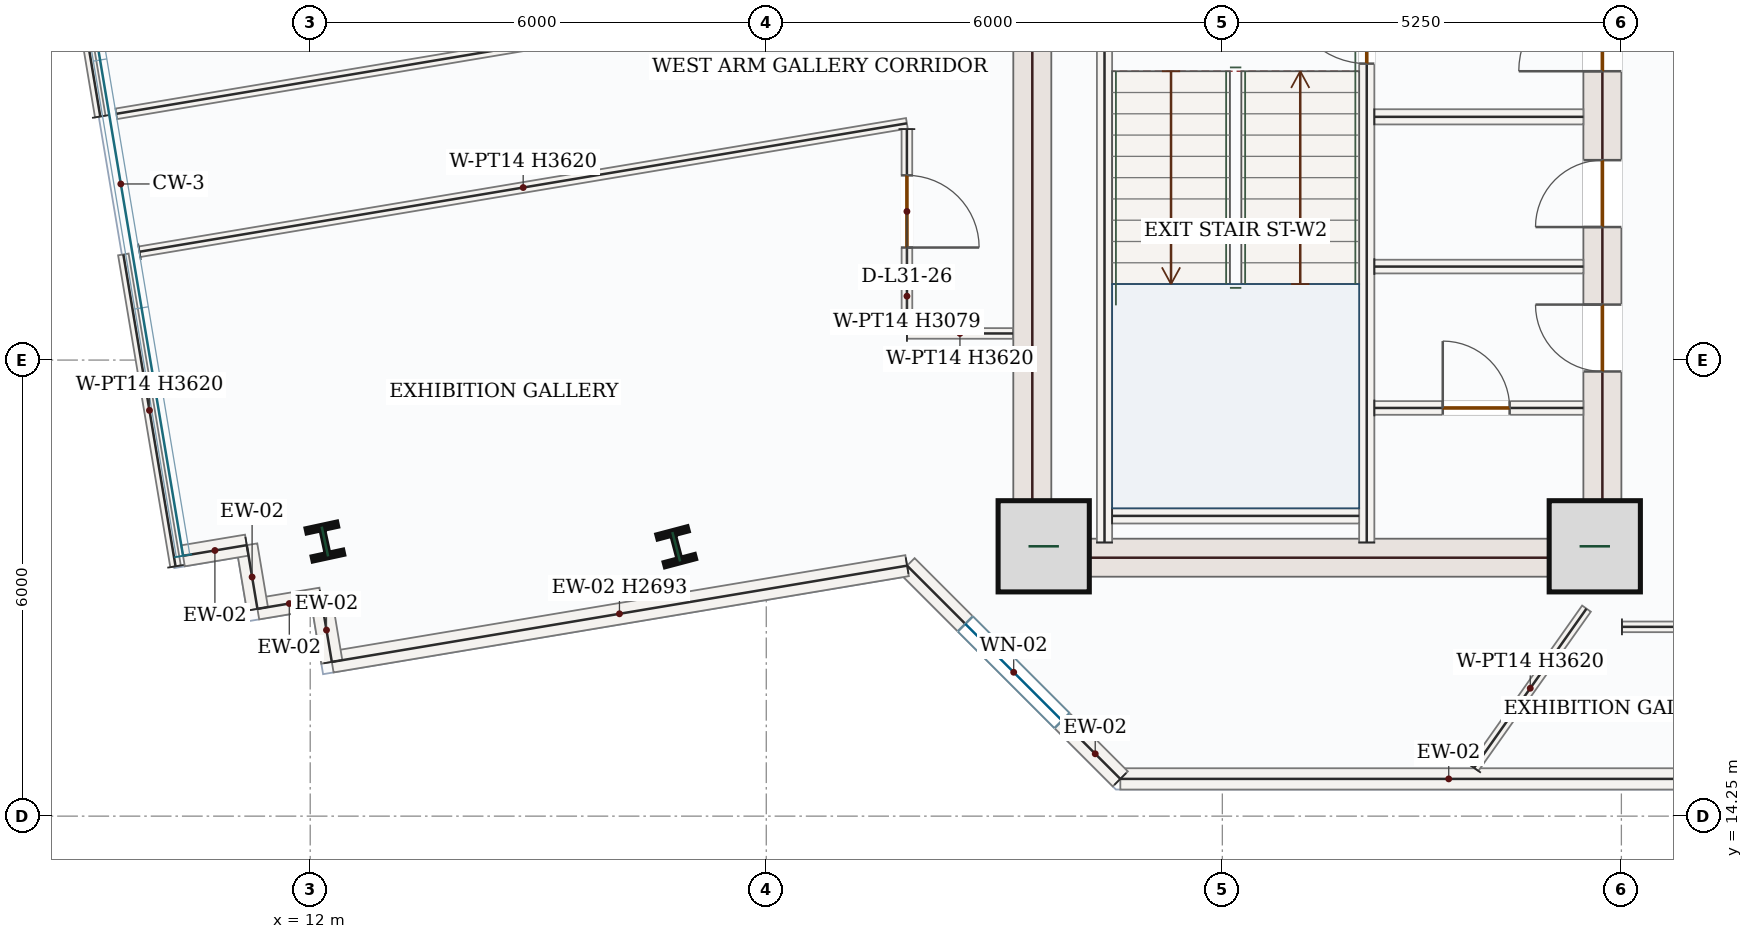
"""IFC4 building model, lengths in metres.
Left out: names, types, materials, properties, quantities, classifications, styles, units other than length and angle.
Written with IfcOpenShell. Run it as: python <this file> out.ifc"""

import sys

from ifc_helpers import new_model, si_unit, direction, frame, frame_2d, origin, origin_2d, place, context, subcontext, project, spatial, rectangle, i_section, extrude, source, transform, mapped, element, fill, save


model = new_model("IFC4")
c1 = context("Model", 3, precision=1e-05, world=origin(), true_north=direction((0.0, 1.0)))
c2 = subcontext(c1, "Body", "Model", "MODEL_VIEW")
j1 = project(units=[si_unit("LENGTHUNIT", "METRE"), si_unit("PLANEANGLEUNIT", "RADIAN")], contexts=[c1])
p1 = place(None, origin())
s1 = spatial("IfcSite", under=j1, at=p1, CompositionType="ELEMENT")
p2 = place(p1, origin())
s2 = spatial("IfcBuilding", under=s1, at=p2, CompositionType="ELEMENT")
p3 = place(p2, frame((0.0, 0.0, 139.5)))
s3 = spatial("IfcBuildingStorey", under=s2, at=p3, CompositionType="ELEMENT", Elevation=139.5)
m1 = source(origin(), c2, "Body", "SweptSolid", [
    extrude(rectangle(XDim=8.55, YDim=0.5, at=frame_2d((4.275, 0.0))), origin(), (0.0, 0.0, 1.0), 3.62),
])
p4 = place(p3, frame((21.5, 17.4, 0.0), z_axis=(0.0, 0.0, 1.0), x_axis=(0.0, 1.0, 0.0)))
e1 = element("IfcWall", 1, at=p4, inside=s3, PredefinedType="SHEAR", context=c2, shape_type="MappedRepresentation", body=[
    mapped(m1, transform((0.0, 0.0, 0.0), x_axis=(1.0, 0.0, 0.0), y_axis=(0.0, 1.0, 0.0), z_axis=(0.0, 0.0, 1.0), scale=1.0)),
])
p5 = place(p3, frame((29.0, 17.4, 0.0), z_axis=(0.0, 0.0, 1.0), x_axis=(0.0, 1.0, 0.0)))
e2 = element("IfcWall", 2, at=p5, inside=s3, PredefinedType="SHEAR", context=c2, shape_type="SweptSolid", body=[
    extrude(rectangle(XDim=8.55, YDim=0.5, at=frame_2d((4.275, 0.0))), origin(), (0.0, 0.0, 1.0), 3.62),
])
p6 = place(p5, frame((6.65, 0.0, 0.0)))
e3 = element("IfcOpeningElement", 3, at=p6, cuts=e2, PredefinedType="OPENING", context=c2, shape_type="SweptSolid", body=[
    extrude(rectangle(XDim=1.1, YDim=2.2, at=frame_2d((0.55, 1.1))), frame((0.0, 0.26, 0.0), z_axis=(0.0, -1.0, 0.0), x_axis=(1.0, 0.0, 0.0)), (0.0, 0.0, 1.0), 0.52),
])
p7 = place(p5, frame((2.7, 0.0, 0.0)))
e4 = element("IfcOpeningElement", 4, at=p7, cuts=e2, PredefinedType="OPENING", context=c2, shape_type="SweptSolid", body=[
    extrude(rectangle(XDim=0.88, YDim=2.1, at=frame_2d((0.44, 1.05))), frame((0.0, 0.26, 0.0), z_axis=(0.0, -1.0, 0.0), x_axis=(1.0, 0.0, 0.0)), (0.0, 0.0, 1.0), 0.52),
])
p8 = place(p5, frame((4.6, 0.0, 0.0)))
e5 = element("IfcOpeningElement", 5, at=p8, cuts=e2, PredefinedType="OPENING", context=c2, shape_type="SweptSolid", body=[
    extrude(rectangle(XDim=0.88, YDim=2.1, at=frame_2d((0.44, 1.05))), frame((0.0, 0.26, 0.0), z_axis=(0.0, -1.0, 0.0), x_axis=(1.0, 0.0, 0.0)), (0.0, 0.0, 1.0), 0.52),
])
m2 = source(origin(), c2, "Body", "SweptSolid", [
    extrude(rectangle(XDim=7.0, YDim=0.5, at=frame_2d((3.5, 0.0))), origin(), (0.0, 0.0, 1.0), 3.62),
])
p9 = place(p3, frame((21.75, 17.65, 0.0), z_axis=(0.0, 0.0, 1.0), x_axis=(1.0, 0.0, 0.0)))
e6 = element("IfcWall", 6, at=p9, inside=s3, PredefinedType="SHEAR", context=c2, shape_type="MappedRepresentation", body=[
    mapped(m2, transform((0.0, 0.0, 0.0), x_axis=(1.0, 0.0, 0.0), y_axis=(0.0, 1.0, 0.0), z_axis=(0.0, 0.0, 1.0), scale=1.0)),
])
m3 = source(origin(), c2, "Body", "SweptSolid", [
    extrude(rectangle(XDim=1.2, YDim=1.2, at=origin_2d()), origin(), (0.0, 0.0, 1.0), 3.9),
])
for number, where, z_axis, x_axis in (
    (7, (21.65, 17.8, 0.0), (0.0, 0.0, 1.0), (1.0, 0.0, 0.0)),
    (8, (28.9, 17.8, 0.0), (0.0, 0.0, 1.0), (1.0, 0.0, 0.0)),
):
    element("IfcColumn", number, at=place(p3, frame(where, z_axis=z_axis, x_axis=x_axis)), inside=s3, PredefinedType="COLUMN", context=c2, shape_type="MappedRepresentation", body=[
        mapped(m3, transform((0.0, 0.0, 0.0), x_axis=(1.0, 0.0, 0.0), y_axis=(0.0, 1.0, 0.0), z_axis=(0.0, 0.0, 1.0), scale=1.0)),
    ])
m4 = source(origin(), c2, "Body", "SweptSolid", [
    extrude(i_section(OverallWidth=0.412, OverallDepth=0.435, WebThickness=0.036, FlangeThickness=0.057, FilletRadius=0.018, at=origin_2d()), origin(), (0.0, 0.0, 1.0), 3.9),
])
for number, where, z_axis, x_axis in (
    (9, (16.815, 17.794, 0.0), (0.0, 0.0, 1.0), (0.967, 0.255, 0.0)),
    (10, (12.193, 17.863, 0.0), (0.0, 0.0, 1.0), (0.977, 0.211, 0.0)),
):
    element("IfcColumn", number, at=place(p3, frame(where, z_axis=z_axis, x_axis=x_axis)), inside=s3, PredefinedType="COLUMN", context=c2, shape_type="MappedRepresentation", body=[
        mapped(m4, transform((0.0, 0.0, 0.0), x_axis=(1.0, 0.0, 0.0), y_axis=(0.0, 1.0, 0.0), z_axis=(0.0, 0.0, 1.0), scale=1.0)),
    ])
m5 = source(origin(), c2, "Body", "SweptSolid", [
    extrude(rectangle(XDim=8.641, YDim=0.28, at=frame_2d((4.321, 0.0))), origin(), (0.0, 0.0, 1.0), 3.62),
])
p10 = place(p3, frame((31.299, 14.74, 0.0), z_axis=(0.0, 0.0, 1.0), x_axis=(-1.0, 0.0, 0.0)))
e11 = element("IfcWall", 11, at=p10, inside=s3, PredefinedType="SOLIDWALL", context=c2, shape_type="MappedRepresentation", body=[
    mapped(m5, transform((0.0, 0.0, 0.0), x_axis=(1.0, 0.0, 0.0), y_axis=(0.0, 1.0, 0.0), z_axis=(0.0, 0.0, 1.0), scale=1.0)),
])
p11 = place(p3, frame((22.658, 14.74, 0.0), z_axis=(0.0, 0.0, 1.0), x_axis=(-0.707076011326, 0.707137549708, 0.0)))
e12 = element("IfcWall", 12, at=p11, inside=s3, PredefinedType="SOLIDWALL", context=c2, shape_type="SweptSolid", body=[
    extrude(rectangle(XDim=3.967, YDim=0.28, at=frame_2d((1.984, 0.0))), origin(), (0.0, 0.0, 1.0), 3.62),
])
p12 = place(p11, frame((1.084, 0.0, 0.85)))
e13 = element("IfcOpeningElement", 13, at=p12, cuts=e12, PredefinedType="OPENING", context=c2, shape_type="SweptSolid", body=[
    extrude(rectangle(XDim=1.8, YDim=1.75, at=frame_2d((0.9, 0.875))), frame((0.0, 0.15, 0.0), z_axis=(0.0, -1.0, 0.0), x_axis=(1.0, 0.0, 0.0)), (0.0, 0.0, 1.0), 0.3),
])
m6 = source(origin(), c2, "Body", "SweptSolid", [
    extrude(rectangle(XDim=7.674, YDim=0.28, at=frame_2d((3.837, 0.0))), origin(), (0.0, 0.0, 1.0), 2.693),
])
p13 = place(p3, frame((19.853, 17.545, 0.0), z_axis=(0.0, 0.0, 1.0), x_axis=(-0.986284504747, -0.165054159886, 0.0)))
e14 = element("IfcWall", 14, at=p13, inside=s3, PredefinedType="SOLIDWALL", context=c2, shape_type="MappedRepresentation", body=[
    mapped(m6, transform((0.0, 0.0, 0.0), x_axis=(1.0, 0.0, 0.0), y_axis=(0.0, 1.0, 0.0), z_axis=(0.0, 0.0, 1.0), scale=1.0)),
])
m7 = source(origin(), c2, "Body", "SweptSolid", [
    extrude(rectangle(XDim=0.85, YDim=0.28, at=frame_2d((0.425, 0.0))), origin(), (0.0, 0.0, 1.0), 3.62),
])
for number, where, z_axis, x_axis in (
    (15, (12.284, 16.279, 0.0), (0.0, 0.0, 1.0), (-0.165, 0.986, 0.0)),
    (16, (12.144, 17.117, 0.0), (0.0, 0.0, 1.0), (-0.986, -0.165, 0.0)),
    (17, (11.306, 16.977, 0.0), (0.0, 0.0, 1.0), (-0.165, 0.986, 0.0)),
    (18, (11.165, 17.815, 0.0), (0.0, 0.0, 1.0), (-0.986, -0.165, 0.0)),
):
    element("IfcWall", number, at=place(p3, frame(where, z_axis=z_axis, x_axis=x_axis)), inside=s3, PredefinedType="SOLIDWALL", context=c2, shape_type="MappedRepresentation", body=[
        mapped(m7, transform((0.0, 0.0, 0.0), x_axis=(1.0, 0.0, 0.0), y_axis=(0.0, 1.0, 0.0), z_axis=(0.0, 0.0, 1.0), scale=1.0)),
    ])
m8 = source(origin(), c2, "Body", "SweptSolid", [
    extrude(rectangle(XDim=7.87, YDim=0.2, at=frame_2d((3.935, 0.0))), origin(), (0.0, 0.0, 1.0), 3.62),
])
p14 = place(p3, frame((22.45, 17.85, 0.0), z_axis=(0.0, 0.0, 1.0), x_axis=(0.0, 1.0, 0.0)))
e19 = element("IfcWall", 19, at=p14, inside=s3, PredefinedType="SOLIDWALL", context=c2, shape_type="MappedRepresentation", body=[
    mapped(m8, transform((0.0, 0.0, 0.0), x_axis=(1.0, 0.0, 0.0), y_axis=(0.0, 1.0, 0.0), z_axis=(0.0, 0.0, 1.0), scale=1.0)),
])
p15 = place(p3, frame((25.9, 17.85, 0.0), z_axis=(0.0, 0.0, 1.0), x_axis=(0.0, 1.0, 0.0)))
e20 = element("IfcWall", 20, at=p15, inside=s3, PredefinedType="SOLIDWALL", context=c2, shape_type="SweptSolid", body=[
    extrude(rectangle(XDim=8.0, YDim=0.2, at=frame_2d((4.0, 0.0))), origin(), (0.0, 0.0, 1.0), 3.62),
])
p16 = place(p15, frame((6.3, 0.0, 0.0)))
e21 = element("IfcOpeningElement", 21, at=p16, cuts=e20, PredefinedType="OPENING", context=c2, shape_type="SweptSolid", body=[
    extrude(rectangle(XDim=1.05, YDim=2.15, at=frame_2d((0.525, 1.075))), frame((0.0, 0.11, 0.0), z_axis=(0.0, -1.0, 0.0), x_axis=(1.0, 0.0, 0.0)), (0.0, 0.0, 1.0), 0.22),
])
m9 = source(origin(), c2, "Body", "SweptSolid", [
    extrude(rectangle(XDim=3.25, YDim=0.2, at=frame_2d((1.625, 0.0))), origin(), (0.0, 0.0, 1.0), 3.62),
])
p17 = place(p3, frame((22.55, 18.2, 0.0), z_axis=(0.0, 0.0, 1.0), x_axis=(1.0, 0.0, 0.0)))
e22 = element("IfcWall", 22, at=p17, inside=s3, PredefinedType="SOLIDWALL", context=c2, shape_type="MappedRepresentation", body=[
    mapped(m9, transform((0.0, 0.0, 0.0), x_axis=(1.0, 0.0, 0.0), y_axis=(0.0, 1.0, 0.0), z_axis=(0.0, 0.0, 1.0), scale=1.0)),
])
m10 = source(origin(), c2, "Body", "SweptSolid", [
    extrude(rectangle(XDim=2.75, YDim=0.2, at=frame_2d((1.375, 0.0))), origin(), (0.0, 0.0, 1.0), 3.62),
])
p18 = place(p3, frame((26.0, 23.45, 0.0), z_axis=(0.0, 0.0, 1.0), x_axis=(1.0, 0.0, 0.0)))
e23 = element("IfcWall", 23, at=p18, inside=s3, PredefinedType="SOLIDWALL", context=c2, shape_type="MappedRepresentation", body=[
    mapped(m10, transform((0.0, 0.0, 0.0), x_axis=(1.0, 0.0, 0.0), y_axis=(0.0, 1.0, 0.0), z_axis=(0.0, 0.0, 1.0), scale=1.0)),
])
p19 = place(p3, frame((26.0, 19.62, 0.0), z_axis=(0.0, 0.0, 1.0), x_axis=(1.0, 0.0, 0.0)))
e24 = element("IfcWall", 24, at=p19, inside=s3, PredefinedType="PARTITIONING", context=c2, shape_type="SweptSolid", body=[
    extrude(rectangle(XDim=2.75, YDim=0.18, at=frame_2d((1.375, 0.0))), origin(), (0.0, 0.0, 1.0), 3.62),
])
p20 = place(p19, frame((0.9, 0.0, 0.0)))
e25 = element("IfcOpeningElement", 25, at=p20, cuts=e24, PredefinedType="OPENING", context=c2, shape_type="SweptSolid", body=[
    extrude(rectangle(XDim=0.88, YDim=2.1, at=frame_2d((0.44, 1.05))), frame((0.0, 0.1, 0.0), z_axis=(0.0, -1.0, 0.0), x_axis=(1.0, 0.0, 0.0)), (0.0, 0.0, 1.0), 0.2),
])
m11 = source(origin(), c2, "Body", "SweptSolid", [
    extrude(rectangle(XDim=2.75, YDim=0.18, at=frame_2d((1.375, 0.0))), origin(), (0.0, 0.0, 1.0), 3.62),
])
p21 = place(p3, frame((26.0, 21.48, 0.0), z_axis=(0.0, 0.0, 1.0), x_axis=(1.0, 0.0, 0.0)))
e26 = element("IfcWall", 26, at=p21, inside=s3, PredefinedType="PARTITIONING", context=c2, shape_type="MappedRepresentation", body=[
    mapped(m11, transform((0.0, 0.0, 0.0), x_axis=(1.0, 0.0, 0.0), y_axis=(0.0, 1.0, 0.0), z_axis=(0.0, 0.0, 1.0), scale=1.0)),
])
p22 = place(p3, frame((29.258, 16.74, 0.0), z_axis=(0.0, 0.0, 1.0), x_axis=(0.999999999474, -3.2436991e-05, 0.0)))
e27 = element("IfcWall", 27, at=p22, inside=s3, PredefinedType="PARTITIONING", context=c2, shape_type="SweptSolid", body=[
    extrude(rectangle(XDim=7.527, YDim=0.14, at=frame_2d((3.763, 0.0))), origin(), (0.0, 0.0, 1.0), 3.62),
])
p23 = place(p22, frame((5.13, 0.0, 0.0)))
e28 = element("IfcOpeningElement", 28, at=p23, cuts=e27, PredefinedType="OPENING", context=c2, shape_type="SweptSolid", body=[
    extrude(rectangle(XDim=0.95, YDim=2.15, at=frame_2d((0.475, 1.075))), frame((0.0, 0.08, 0.0), z_axis=(0.0, -1.0, 0.0), x_axis=(1.0, 0.0, 0.0)), (0.0, 0.0, 1.0), 0.16),
])
m12 = source(origin(), c2, "Body", "SweptSolid", [
    extrude(rectangle(XDim=2.565, YDim=0.14, at=frame_2d((1.282, 0.0))), origin(), (0.0, 0.0, 1.0), 3.62),
])
p24 = place(p3, frame((27.311, 14.885, 0.0), z_axis=(0.0, 0.0, 1.0), x_axis=(0.576926084836, 0.816796359343, 0.0)))
e29 = element("IfcWall", 29, at=p24, inside=s3, PredefinedType="PARTITIONING", context=c2, shape_type="MappedRepresentation", body=[
    mapped(m12, transform((0.0, 0.0, 0.0), x_axis=(1.0, 0.0, 0.0), y_axis=(0.0, 1.0, 0.0), z_axis=(0.0, 0.0, 1.0), scale=1.0)),
])
m13 = source(origin(), c2, "Body", "SweptSolid", [
    extrude(rectangle(XDim=10.544, YDim=0.14, at=frame_2d((5.272, 0.0))), origin(), (0.0, 0.0, 1.0), 3.62),
])
p25 = place(p3, frame((19.85, 25.23, 0.0), z_axis=(0.0, 0.0, 1.0), x_axis=(-0.986287336963, -0.165037235031, 0.0)))
e30 = element("IfcWall", 30, at=p25, inside=s3, PredefinedType="PARTITIONING", context=c2, shape_type="MappedRepresentation", body=[
    mapped(m13, transform((0.0, 0.0, 0.0), x_axis=(1.0, 0.0, 0.0), y_axis=(0.0, 1.0, 0.0), z_axis=(0.0, 0.0, 1.0), scale=1.0)),
])
m14 = source(origin(), c2, "Body", "SweptSolid", [
    extrude(rectangle(XDim=4.16, YDim=0.14, at=frame_2d((2.08, 0.0))), origin(), (0.0, 0.0, 1.0), 3.62),
])
for number, where, z_axis, x_axis in (
    (31, (9.238, 23.454, 0.0), (0.0, 0.0, 1.0), (-0.165, 0.986, 0.0)),
    (32, (10.229, 17.537, 0.0), (0.0, 0.0, 1.0), (-0.165, 0.986, 0.0)),
):
    element("IfcWall", number, at=place(p3, frame(where, z_axis=z_axis, x_axis=x_axis)), inside=s3, PredefinedType="PARTITIONING", context=c2, shape_type="MappedRepresentation", body=[
        mapped(m14, transform((0.0, 0.0, 0.0), x_axis=(1.0, 0.0, 0.0), y_axis=(0.0, 1.0, 0.0), z_axis=(0.0, 0.0, 1.0), scale=1.0)),
    ])
m15 = source(origin(), c2, "Body", "SweptSolid", [
    extrude(rectangle(XDim=10.237, YDim=0.14, at=frame_2d((5.118, 0.0))), origin(), (0.0, 0.0, 1.0), 3.62),
])
p26 = place(p3, frame((9.754, 21.675, 0.0), z_axis=(0.0, 0.0, 1.0), x_axis=(0.986290594835, 0.165017764319, 0.0)))
e33 = element("IfcWall", 33, at=p26, inside=s3, PredefinedType="PARTITIONING", context=c2, shape_type="MappedRepresentation", body=[
    mapped(m15, transform((0.0, 0.0, 0.0), x_axis=(1.0, 0.0, 0.0), y_axis=(0.0, 1.0, 0.0), z_axis=(0.0, 0.0, 1.0), scale=1.0)),
])
p27 = place(p3, frame((19.85, 23.289, 0.0), z_axis=(0.0, 0.0, 1.0), x_axis=(0.000363372069, -0.99999993398, 0.0)))
e34 = element("IfcWall", 34, at=p27, inside=s3, PredefinedType="PARTITIONING", context=c2, shape_type="SweptSolid", body=[
    extrude(rectangle(XDim=2.688, YDim=0.14, at=frame_2d((1.344, 0.0))), origin(), (0.0, 0.0, 1.0), 3.079),
])
p28 = place(p27, frame((0.608, 0.0, 0.0)))
e35 = element("IfcOpeningElement", 35, at=p28, cuts=e34, PredefinedType="OPENING", context=c2, shape_type="SweptSolid", body=[
    extrude(rectangle(XDim=0.95, YDim=2.15, at=frame_2d((0.475, 1.075))), frame((0.0, 0.08, 0.0), z_axis=(0.0, -1.0, 0.0), x_axis=(1.0, 0.0, 0.0)), (0.0, 0.0, 1.0), 0.16),
])
m16 = source(origin(), c2, "Body", "SweptSolid", [
    extrude(rectangle(XDim=1.394, YDim=0.14, at=frame_2d((0.697, 0.0))), origin(), (0.0, 0.0, 1.0), 3.62),
])
p29 = place(p3, frame((19.851, 20.601, 0.0), z_axis=(0.0, 0.0, 1.0), x_axis=(0.999999754632, -0.000700525222, 0.0)))
e36 = element("IfcWall", 36, at=p29, inside=s3, PredefinedType="PARTITIONING", context=c2, shape_type="MappedRepresentation", body=[
    mapped(m16, transform((0.0, 0.0, 0.0), x_axis=(1.0, 0.0, 0.0), y_axis=(0.0, 1.0, 0.0), z_axis=(0.0, 0.0, 1.0), scale=1.0)),
])
m17 = source(origin(), c2, "Body", "SweptSolid", [
    extrude(rectangle(XDim=1.8, YDim=1.75, at=frame_2d((0.9, 0.875))), frame((0.0, 0.03, 0.0), z_axis=(0.0, -1.0, 0.0), x_axis=(1.0, 0.0, 0.0)), (0.0, 0.0, 1.0), 0.06),
])
p30 = place(p12, origin())
e37 = element("IfcWindow", 37, at=p30, inside=s3, PartitioningType="DOUBLE_PANEL_VERTICAL", PredefinedType="WINDOW", context=c2, shape_type="MappedRepresentation", body=[
    mapped(m17, transform((0.0, 0.0, 0.0), x_axis=(1.0, 0.0, 0.0), y_axis=(0.0, 1.0, 0.0), z_axis=(0.0, 0.0, 1.0), scale=1.0)),
])
fill(e13, e37)
m18 = source(origin(), c2, "Body", "SweptSolid", [
    extrude(rectangle(XDim=1.05, YDim=2.15, at=frame_2d((0.525, 1.075))), frame((0.0, 0.025, 0.0), z_axis=(0.0, -1.0, 0.0), x_axis=(1.0, 0.0, 0.0)), (0.0, 0.0, 1.0), 0.05),
])
p31 = place(p16, origin())
e38 = element("IfcDoor", 38, at=p31, inside=s3, OperationType="SINGLE_SWING_RIGHT", PredefinedType="DOOR", context=c2, shape_type="MappedRepresentation", body=[
    mapped(m18, transform((0.0, 0.0, 0.0), x_axis=(1.0, 0.0, 0.0), y_axis=(0.0, 1.0, 0.0), z_axis=(0.0, 0.0, 1.0), scale=1.0)),
])
fill(e21, e38)
m19 = source(origin(), c2, "Body", "SweptSolid", [
    extrude(rectangle(XDim=1.1, YDim=2.2, at=frame_2d((0.55, 1.1))), frame((0.0, 0.025, 0.0), z_axis=(0.0, -1.0, 0.0), x_axis=(1.0, 0.0, 0.0)), (0.0, 0.0, 1.0), 0.05),
])
p32 = place(p6, origin())
e39 = element("IfcDoor", 39, at=p32, inside=s3, OperationType="SINGLE_SWING_LEFT", PredefinedType="DOOR", context=c2, shape_type="MappedRepresentation", body=[
    mapped(m19, transform((0.0, 0.0, 0.0), x_axis=(1.0, 0.0, 0.0), y_axis=(0.0, 1.0, 0.0), z_axis=(0.0, 0.0, 1.0), scale=1.0)),
])
fill(e3, e39)
m20 = source(origin(), c2, "Body", "SweptSolid", [
    extrude(rectangle(XDim=0.88, YDim=2.1, at=frame_2d((0.44, 1.05))), frame((0.0, 0.025, 0.0), z_axis=(0.0, -1.0, 0.0), x_axis=(1.0, 0.0, 0.0)), (0.0, 0.0, 1.0), 0.05),
])
p33 = place(p20, origin())
e40 = element("IfcDoor", 40, at=p33, inside=s3, OperationType="SINGLE_SWING_LEFT", PredefinedType="DOOR", context=c2, shape_type="MappedRepresentation", body=[
    mapped(m20, transform((0.0, 0.0, 0.0), x_axis=(1.0, 0.0, 0.0), y_axis=(0.0, 1.0, 0.0), z_axis=(0.0, 0.0, 1.0), scale=1.0)),
])
fill(e25, e40)
p34 = place(p7, origin())
e41 = element("IfcDoor", 41, at=p34, inside=s3, OperationType="SINGLE_SWING_RIGHT", PredefinedType="DOOR", context=c2, shape_type="MappedRepresentation", body=[
    mapped(m20, transform((0.0, 0.0, 0.0), x_axis=(1.0, 0.0, 0.0), y_axis=(0.0, 1.0, 0.0), z_axis=(0.0, 0.0, 1.0), scale=1.0)),
])
fill(e4, e41)
p35 = place(p8, origin())
e42 = element("IfcDoor", 42, at=p35, inside=s3, OperationType="SINGLE_SWING_LEFT", PredefinedType="DOOR", context=c2, shape_type="MappedRepresentation", body=[
    mapped(m20, transform((0.0, 0.0, 0.0), x_axis=(1.0, 0.0, 0.0), y_axis=(0.0, 1.0, 0.0), z_axis=(0.0, 0.0, 1.0), scale=1.0)),
])
fill(e5, e42)
m21 = source(origin(), c2, "Body", "SweptSolid", [
    extrude(rectangle(XDim=0.95, YDim=2.15, at=frame_2d((0.475, 1.075))), frame((0.0, 0.025, 0.0), z_axis=(0.0, -1.0, 0.0), x_axis=(1.0, 0.0, 0.0)), (0.0, 0.0, 1.0), 0.05),
])
p36 = place(p28, origin())
e43 = element("IfcDoor", 43, at=p36, inside=s3, OperationType="SINGLE_SWING_RIGHT", PredefinedType="DOOR", context=c2, shape_type="MappedRepresentation", body=[
    mapped(m21, transform((0.0, 0.0, 0.0), x_axis=(1.0, 0.0, 0.0), y_axis=(0.0, 1.0, 0.0), z_axis=(0.0, 0.0, 1.0), scale=1.0)),
])
fill(e35, e43)
save(model, sys.argv[1])
